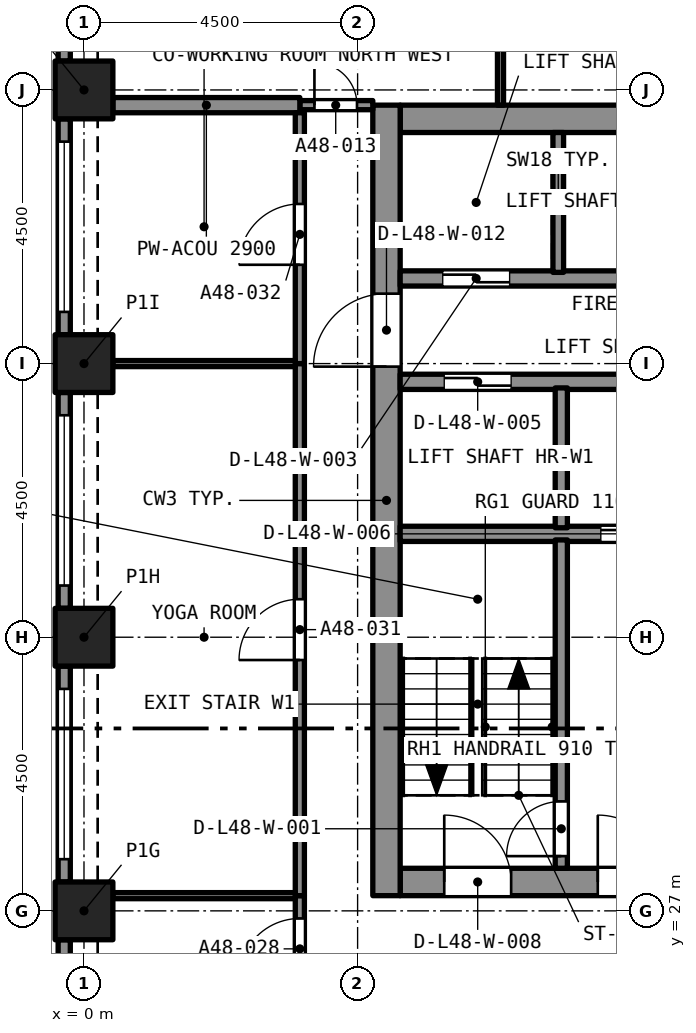
"""IFC4 building model, lengths in metres.
Left out: names, types, materials, properties, quantities, classifications, styles, units other than length and angle.
Written with IfcOpenShell. Run it as: python <this file> out.ifc"""

import sys

from ifc_helpers import new_model, si_unit, direction, frame, frame_2d, origin, origin_2d, place, context, subcontext, project, spatial, rectangle, extrude, element, fill, save


model = new_model("IFC4")
c1 = context("Model", 3, precision=1e-05, world=origin(), true_north=direction((0.0, 1.0)))
c2 = subcontext(c1, "Body", "Model", "MODEL_VIEW")
j1 = project(units=[si_unit("LENGTHUNIT", "METRE"), si_unit("PLANEANGLEUNIT", "RADIAN")], contexts=[c1])
p1 = place(None, origin())
s1 = spatial("IfcSite", under=j1, at=p1, CompositionType="ELEMENT")
p2 = place(p1, origin())
s2 = spatial("IfcBuilding", under=s1, at=p2, CompositionType="ELEMENT")
p3 = place(p2, frame((0.0, 0.0, 176.3)))
s3 = spatial("IfcBuildingStorey", under=s2, at=p3, CompositionType="ELEMENT", Elevation=176.3)
for number, where, z_axis, x_axis in (
    (1, (0.0, 27.0, 0.0), (0.0, 0.0, 1.0), (1.0, 0.0, 0.0)),
    (2, (0.0, 31.5, 0.0), (0.0, 0.0, 1.0), (1.0, 0.0, 0.0)),
    (3, (0.0, 36.0, 0.0), (0.0, 0.0, 1.0), (1.0, 0.0, 0.0)),
    (4, (0.0, 40.5, 0.0), (0.0, 0.0, 1.0), (1.0, 0.0, 0.0)),
):
    element("IfcColumn", number, at=place(p3, frame(where, z_axis=z_axis, x_axis=x_axis)), inside=s3, PredefinedType="COLUMN", context=c2, shape_type="SweptSolid", body=[
        extrude(rectangle(XDim=0.95, YDim=0.95, at=origin_2d()), origin(), (0.0, 0.0, 1.0), 3.2),
    ])
p4 = place(p3, frame((5.2, 27.475, 0.0), z_axis=(0.0, 0.0, 1.0), x_axis=(1.0, 0.0, 0.0)))
e5 = element("IfcWall", 5, at=p4, inside=s3, PredefinedType="SOLIDWALL", context=c2, shape_type="SweptSolid", body=[
    extrude(rectangle(XDim=7.6, YDim=0.45, at=frame_2d((3.8, 0.0))), origin(), (0.0, 0.0, 1.0), 3.2),
])
p5 = place(p4, frame((0.725, 0.0, 0.0)))
e6 = element("IfcOpeningElement", 6, at=p5, cuts=e5, PredefinedType="OPENING", context=c2, shape_type="SweptSolid", body=[
    extrude(rectangle(XDim=1.1, YDim=2.1, at=frame_2d((0.55, 1.05))), frame((0.0, 0.235, 0.0), z_axis=(0.0, -1.0, 0.0), x_axis=(1.0, 0.0, 0.0)), (0.0, 0.0, 1.0), 0.47),
])
p6 = place(p4, frame((3.25, 0.0, 0.0)))
e7 = element("IfcOpeningElement", 7, at=p6, cuts=e5, PredefinedType="OPENING", context=c2, shape_type="SweptSolid", body=[
    extrude(rectangle(XDim=1.1, YDim=2.1, at=frame_2d((0.55, 1.05))), frame((0.0, 0.235, 0.0), z_axis=(0.0, -1.0, 0.0), x_axis=(1.0, 0.0, 0.0)), (0.0, 0.0, 1.0), 0.47),
])
p7 = place(p4, frame((5.775, 0.0, 0.0)))
e8 = element("IfcOpeningElement", 8, at=p7, cuts=e5, PredefinedType="OPENING", context=c2, shape_type="SweptSolid", body=[
    extrude(rectangle(XDim=1.1, YDim=2.1, at=frame_2d((0.55, 1.05))), frame((0.0, 0.235, 0.0), z_axis=(0.0, -1.0, 0.0), x_axis=(1.0, 0.0, 0.0)), (0.0, 0.0, 1.0), 0.47),
])
p8 = place(p3, frame((5.2, 40.025, 0.0), z_axis=(0.0, 0.0, 1.0), x_axis=(1.0, 0.0, 0.0)))
e9 = element("IfcWall", 9, at=p8, inside=s3, PredefinedType="SOLIDWALL", context=c2, shape_type="SweptSolid", body=[
    extrude(rectangle(XDim=7.6, YDim=0.45, at=frame_2d((3.8, 0.0))), origin(), (0.0, 0.0, 1.0), 3.2),
])
p9 = place(p3, frame((4.975, 27.25, 0.0), z_axis=(0.0, 0.0, 1.0), x_axis=(0.0, 1.0, 0.0)))
e10 = element("IfcWall", 10, at=p9, inside=s3, PredefinedType="SOLIDWALL", context=c2, shape_type="SweptSolid", body=[
    extrude(rectangle(XDim=13.0, YDim=0.45, at=frame_2d((6.5, 0.0))), origin(), (0.0, 0.0, 1.0), 3.2),
])
p10 = place(p9, frame((8.7, 0.0, 0.0)))
e11 = element("IfcOpeningElement", 11, at=p10, cuts=e10, PredefinedType="OPENING", context=c2, shape_type="SweptSolid", body=[
    extrude(rectangle(XDim=1.2, YDim=2.1, at=frame_2d((0.6, 1.05))), frame((0.0, 0.235, 0.0), z_axis=(0.0, -1.0, 0.0), x_axis=(1.0, 0.0, 0.0)), (0.0, 0.0, 1.0), 0.47),
])
p11 = place(p3, frame((-0.325, 40.975, 0.0), z_axis=(0.0, 0.0, 1.0), x_axis=(0.0, 1.0, 0.0)))
e12 = element("IfcWall", 12, at=p11, inside=s3, PredefinedType="SOLIDWALL", context=c2, shape_type="SweptSolid", body=[
    extrude(rectangle(XDim=3.55, YDim=0.2, at=frame_2d((1.775, 0.0))), origin(), (0.0, 0.0, 1.0), 3.2),
])
p12 = place(p11, frame((0.375, 0.0, 0.45)))
e13 = element("IfcOpeningElement", 13, at=p12, cuts=e12, PredefinedType="OPENING", context=c2, shape_type="SweptSolid", body=[
    extrude(rectangle(XDim=2.8, YDim=1.95, at=frame_2d((1.4, 0.975))), frame((0.0, 0.11, 0.0), z_axis=(0.0, -1.0, 0.0), x_axis=(1.0, 0.0, 0.0)), (0.0, 0.0, 1.0), 0.22),
])
p13 = place(p3, frame((-0.325, 36.475, 0.0), z_axis=(0.0, 0.0, 1.0), x_axis=(0.0, 1.0, 0.0)))
e14 = element("IfcWall", 14, at=p13, inside=s3, PredefinedType="SOLIDWALL", context=c2, shape_type="SweptSolid", body=[
    extrude(rectangle(XDim=3.55, YDim=0.2, at=frame_2d((1.775, 0.0))), origin(), (0.0, 0.0, 1.0), 3.2),
])
p14 = place(p13, frame((0.375, 0.0, 0.45)))
e15 = element("IfcOpeningElement", 15, at=p14, cuts=e14, PredefinedType="OPENING", context=c2, shape_type="SweptSolid", body=[
    extrude(rectangle(XDim=2.8, YDim=1.95, at=frame_2d((1.4, 0.975))), frame((0.0, 0.11, 0.0), z_axis=(0.0, -1.0, 0.0), x_axis=(1.0, 0.0, 0.0)), (0.0, 0.0, 1.0), 0.22),
])
p15 = place(p3, frame((-0.325, 31.975, 0.0), z_axis=(0.0, 0.0, 1.0), x_axis=(0.0, 1.0, 0.0)))
e16 = element("IfcWall", 16, at=p15, inside=s3, PredefinedType="SOLIDWALL", context=c2, shape_type="SweptSolid", body=[
    extrude(rectangle(XDim=3.55, YDim=0.2, at=frame_2d((1.775, 0.0))), origin(), (0.0, 0.0, 1.0), 3.2),
])
p16 = place(p15, frame((0.375, 0.0, 0.45)))
e17 = element("IfcOpeningElement", 17, at=p16, cuts=e16, PredefinedType="OPENING", context=c2, shape_type="SweptSolid", body=[
    extrude(rectangle(XDim=2.8, YDim=1.95, at=frame_2d((1.4, 0.975))), frame((0.0, 0.11, 0.0), z_axis=(0.0, -1.0, 0.0), x_axis=(1.0, 0.0, 0.0)), (0.0, 0.0, 1.0), 0.22),
])
p17 = place(p3, frame((-0.325, 27.475, 0.0), z_axis=(0.0, 0.0, 1.0), x_axis=(0.0, 1.0, 0.0)))
e18 = element("IfcWall", 18, at=p17, inside=s3, PredefinedType="SOLIDWALL", context=c2, shape_type="SweptSolid", body=[
    extrude(rectangle(XDim=3.55, YDim=0.2, at=frame_2d((1.775, 0.0))), origin(), (0.0, 0.0, 1.0), 3.2),
])
p18 = place(p17, frame((0.375, 0.0, 0.45)))
e19 = element("IfcOpeningElement", 19, at=p18, cuts=e18, PredefinedType="OPENING", context=c2, shape_type="SweptSolid", body=[
    extrude(rectangle(XDim=2.8, YDim=1.95, at=frame_2d((1.4, 0.975))), frame((0.0, 0.11, 0.0), z_axis=(0.0, -1.0, 0.0), x_axis=(1.0, 0.0, 0.0)), (0.0, 0.0, 1.0), 0.22),
])
p19 = place(p3, frame((-0.325, 22.975, 0.0), z_axis=(0.0, 0.0, 1.0), x_axis=(0.0, 1.0, 0.0)))
e20 = element("IfcWall", 20, at=p19, inside=s3, PredefinedType="SOLIDWALL", context=c2, shape_type="SweptSolid", body=[
    extrude(rectangle(XDim=3.55, YDim=0.2, at=frame_2d((1.775, 0.0))), origin(), (0.0, 0.0, 1.0), 3.2),
])
p20 = place(p19, frame((0.375, 0.0, 0.45)))
e21 = element("IfcOpeningElement", 21, at=p20, cuts=e20, PredefinedType="OPENING", context=c2, shape_type="SweptSolid", body=[
    extrude(rectangle(XDim=2.8, YDim=1.95, at=frame_2d((1.4, 0.975))), frame((0.0, 0.11, 0.0), z_axis=(0.0, -1.0, 0.0), x_axis=(1.0, 0.0, 0.0)), (0.0, 0.0, 1.0), 0.22),
])
p21 = place(p3, frame((6.85, 40.25, 0.0), z_axis=(0.0, 0.0, 1.0), x_axis=(0.0, 1.0, 0.0)))
e22 = element("IfcWall", 22, at=p21, inside=s3, PredefinedType="PARTITIONING", context=c2, shape_type="SweptSolid", body=[
    extrude(rectangle(XDim=3.32, YDim=0.1, at=frame_2d((1.66, 0.0))), origin(), (0.0, 0.0, 1.0), 2.9),
])
p22 = place(p3, frame((3.55, 40.25, 0.0), z_axis=(0.0, 0.0, 1.0), x_axis=(1.0, 0.0, 0.0)))
e23 = element("IfcWall", 23, at=p22, inside=s3, PredefinedType="PARTITIONING", context=c2, shape_type="SweptSolid", body=[
    extrude(rectangle(XDim=1.2, YDim=0.15, at=frame_2d((0.6, 0.0))), origin(), (0.0, 0.0, 1.0), 2.9),
])
p23 = place(p22, frame((0.24, 0.0, 0.0)))
e24 = element("IfcOpeningElement", 24, at=p23, cuts=e23, PredefinedType="OPENING", context=c2, shape_type="SweptSolid", body=[
    extrude(rectangle(XDim=0.7, YDim=2.1, at=frame_2d((0.35, 1.05))), frame((0.0, 0.085, 0.0), z_axis=(0.0, -1.0, 0.0), x_axis=(1.0, 0.0, 0.0)), (0.0, 0.0, 1.0), 0.17),
])
p24 = place(p3, frame((0.475, 40.25, 0.0), z_axis=(0.0, 0.0, 1.0), x_axis=(1.0, 0.0, 0.0)))
e25 = element("IfcWall", 25, at=p24, inside=s3, PredefinedType="PARTITIONING", context=c2, shape_type="SweptSolid", body=[
    extrude(rectangle(XDim=3.075, YDim=0.25, at=frame_2d((1.538, 0.0))), origin(), (0.0, 0.0, 1.0), 2.9),
])
p25 = place(p3, frame((3.55, 25.425, 0.0), z_axis=(0.0, 0.0, 1.0), x_axis=(0.0, 1.0, 0.0)))
e26 = element("IfcWall", 26, at=p25, inside=s3, PredefinedType="PARTITIONING", context=c2, shape_type="SweptSolid", body=[
    extrude(rectangle(XDim=1.825, YDim=0.15, at=frame_2d((0.913, 0.0))), origin(), (0.0, 0.0, 1.0), 2.9),
])
p26 = place(p25, frame((0.45, 0.0, 0.0)))
e27 = element("IfcOpeningElement", 27, at=p26, cuts=e26, PredefinedType="OPENING", context=c2, shape_type="SweptSolid", body=[
    extrude(rectangle(XDim=1.0, YDim=2.1, at=frame_2d((0.5, 1.05))), frame((0.0, 0.085, 0.0), z_axis=(0.0, -1.0, 0.0), x_axis=(1.0, 0.0, 0.0)), (0.0, 0.0, 1.0), 0.17),
])
p27 = place(p3, frame((3.55, 27.25, 0.0), z_axis=(0.0, 0.0, 1.0), x_axis=(0.0, 1.0, 0.0)))
e28 = element("IfcWall", 28, at=p27, inside=s3, PredefinedType="PARTITIONING", context=c2, shape_type="SweptSolid", body=[
    extrude(rectangle(XDim=8.75, YDim=0.15, at=frame_2d((4.375, 0.0))), origin(), (0.0, 0.0, 1.0), 2.9),
])
p28 = place(p27, frame((3.875, 0.0, 0.0)))
e29 = element("IfcOpeningElement", 29, at=p28, cuts=e28, PredefinedType="OPENING", context=c2, shape_type="SweptSolid", body=[
    extrude(rectangle(XDim=1.0, YDim=2.1, at=frame_2d((0.5, 1.05))), frame((0.0, 0.085, 0.0), z_axis=(0.0, -1.0, 0.0), x_axis=(1.0, 0.0, 0.0)), (0.0, 0.0, 1.0), 0.17),
])
p29 = place(p3, frame((3.55, 36.0, 0.0), z_axis=(0.0, 0.0, 1.0), x_axis=(0.0, 1.0, 0.0)))
e30 = element("IfcWall", 30, at=p29, inside=s3, PredefinedType="PARTITIONING", context=c2, shape_type="SweptSolid", body=[
    extrude(rectangle(XDim=4.125, YDim=0.15, at=frame_2d((2.062, 0.0))), origin(), (0.0, 0.0, 1.0), 2.9),
])
p30 = place(p29, frame((1.625, 0.0, 0.0)))
e31 = element("IfcOpeningElement", 31, at=p30, cuts=e30, PredefinedType="OPENING", context=c2, shape_type="SweptSolid", body=[
    extrude(rectangle(XDim=1.0, YDim=2.1, at=frame_2d((0.5, 1.05))), frame((0.0, 0.085, 0.0), z_axis=(0.0, -1.0, 0.0), x_axis=(1.0, 0.0, 0.0)), (0.0, 0.0, 1.0), 0.17),
])
for number, where, z_axis, x_axis in (
    (32, (0.475, 27.25, 0.0), (0.0, 0.0, 1.0), (1.0, 0.0, 0.0)),
    (33, (0.475, 36.0, 0.0), (0.0, 0.0, 1.0), (1.0, 0.0, 0.0)),
):
    element("IfcWall", number, at=place(p3, frame(where, z_axis=z_axis, x_axis=x_axis)), inside=s3, PredefinedType="PARTITIONING", context=c2, shape_type="SweptSolid", body=[
        extrude(rectangle(XDim=3.0, YDim=0.1, at=frame_2d((1.5, 0.0))), origin(), (0.0, 0.0, 1.0), 2.9),
    ])
p31 = place(p3, frame((5.2, 33.2, 0.0), z_axis=(0.0, 0.0, 1.0), x_axis=(1.0, 0.0, 0.0)))
e34 = element("IfcWall", 34, at=p31, inside=s3, PredefinedType="SOLIDWALL", context=c2, shape_type="SweptSolid", body=[
    extrude(rectangle(XDim=7.6, YDim=0.25, at=frame_2d((3.8, 0.0))), origin(), (0.0, 0.0, 1.0), 2.9),
])
p32 = place(p31, frame((3.3, 0.0, 0.0)))
e35 = element("IfcOpeningElement", 35, at=p32, cuts=e34, PredefinedType="OPENING", context=c2, shape_type="SweptSolid", body=[
    extrude(rectangle(XDim=1.0, YDim=2.1, at=frame_2d((0.5, 1.05))), frame((0.0, 0.135, 0.0), z_axis=(0.0, -1.0, 0.0), x_axis=(1.0, 0.0, 0.0)), (0.0, 0.0, 1.0), 0.27),
])
p33 = place(p3, frame((5.2, 35.7, 0.0), z_axis=(0.0, 0.0, 1.0), x_axis=(1.0, 0.0, 0.0)))
e36 = element("IfcWall", 36, at=p33, inside=s3, PredefinedType="SOLIDWALL", context=c2, shape_type="SweptSolid", body=[
    extrude(rectangle(XDim=7.6, YDim=0.25, at=frame_2d((3.8, 0.0))), origin(), (0.0, 0.0, 1.0), 2.9),
])
p34 = place(p33, frame((0.725, 0.0, 0.0)))
e37 = element("IfcOpeningElement", 37, at=p34, cuts=e36, PredefinedType="OPENING", context=c2, shape_type="SweptSolid", body=[
    extrude(rectangle(XDim=1.1, YDim=2.4, at=frame_2d((0.55, 1.2))), frame((0.0, 0.135, 0.0), z_axis=(0.0, -1.0, 0.0), x_axis=(1.0, 0.0, 0.0)), (0.0, 0.0, 1.0), 0.27),
])
p35 = place(p33, frame((5.875, 0.0, 0.0)))
e38 = element("IfcOpeningElement", 38, at=p35, cuts=e36, PredefinedType="OPENING", context=c2, shape_type="SweptSolid", body=[
    extrude(rectangle(XDim=0.9, YDim=2.1, at=frame_2d((0.45, 1.05))), frame((0.0, 0.135, 0.0), z_axis=(0.0, -1.0, 0.0), x_axis=(1.0, 0.0, 0.0)), (0.0, 0.0, 1.0), 0.27),
])
p36 = place(p3, frame((5.2, 37.4, 0.0), z_axis=(0.0, 0.0, 1.0), x_axis=(1.0, 0.0, 0.0)))
e39 = element("IfcWall", 39, at=p36, inside=s3, PredefinedType="SOLIDWALL", context=c2, shape_type="SweptSolid", body=[
    extrude(rectangle(XDim=7.6, YDim=0.25, at=frame_2d((3.8, 0.0))), origin(), (0.0, 0.0, 1.0), 2.9),
])
p37 = place(p36, frame((0.7, 0.0, 0.0)))
e40 = element("IfcOpeningElement", 40, at=p37, cuts=e39, PredefinedType="OPENING", context=c2, shape_type="SweptSolid", body=[
    extrude(rectangle(XDim=1.1, YDim=2.4, at=frame_2d((0.55, 1.2))), frame((0.0, 0.135, 0.0), z_axis=(0.0, -1.0, 0.0), x_axis=(1.0, 0.0, 0.0)), (0.0, 0.0, 1.0), 0.27),
])
p38 = place(p3, frame((7.85, 27.7, 0.0), z_axis=(0.0, 0.0, 1.0), x_axis=(0.0, 1.0, 0.0)))
e41 = element("IfcWall", 41, at=p38, inside=s3, PredefinedType="SOLIDWALL", context=c2, shape_type="SweptSolid", body=[
    extrude(rectangle(XDim=5.4, YDim=0.2, at=frame_2d((2.7, 0.0))), origin(), (0.0, 0.0, 1.0), 2.9),
])
p39 = place(p38, frame((0.2, 0.0, 0.0)))
e42 = element("IfcOpeningElement", 42, at=p39, cuts=e41, PredefinedType="OPENING", context=c2, shape_type="SweptSolid", body=[
    extrude(rectangle(XDim=0.9, YDim=2.1, at=frame_2d((0.45, 1.05))), frame((0.0, 0.11, 0.0), z_axis=(0.0, -1.0, 0.0), x_axis=(1.0, 0.0, 0.0)), (0.0, 0.0, 1.0), 0.22),
])
p40 = place(p3, frame((7.85, 33.3, 0.0), z_axis=(0.0, 0.0, 1.0), x_axis=(0.0, 1.0, 0.0)))
e43 = element("IfcWall", 43, at=p40, inside=s3, PredefinedType="SOLIDWALL", context=c2, shape_type="SweptSolid", body=[
    extrude(rectangle(XDim=2.3, YDim=0.2, at=frame_2d((1.15, 0.0))), origin(), (0.0, 0.0, 1.0), 2.9),
])
p41 = place(p3, frame((7.8, 37.5, 0.0), z_axis=(0.0, 0.0, 1.0), x_axis=(0.0, 1.0, 0.0)))
e44 = element("IfcWall", 44, at=p41, inside=s3, PredefinedType="SOLIDWALL", context=c2, shape_type="SweptSolid", body=[
    extrude(rectangle(XDim=2.3, YDim=0.175, at=frame_2d((1.15, 0.0))), origin(), (0.0, 0.0, 1.0), 2.9),
])
p42 = place(p14, origin())
e45 = element("IfcWindow", 45, at=p42, inside=s3, PartitioningType="SINGLE_PANEL", PredefinedType="WINDOW", context=c2, shape_type="SweptSolid", body=[
    extrude(rectangle(XDim=2.8, YDim=1.95, at=frame_2d((1.4, 0.975))), frame((0.0, 0.03, 0.0), z_axis=(0.0, -1.0, 0.0), x_axis=(1.0, 0.0, 0.0)), (0.0, 0.0, 1.0), 0.06),
])
fill(e15, e45)
p43 = place(p16, origin())
e46 = element("IfcWindow", 46, at=p43, inside=s3, PartitioningType="SINGLE_PANEL", PredefinedType="WINDOW", context=c2, shape_type="SweptSolid", body=[
    extrude(rectangle(XDim=2.8, YDim=1.95, at=frame_2d((1.4, 0.975))), frame((0.0, 0.03, 0.0), z_axis=(0.0, -1.0, 0.0), x_axis=(1.0, 0.0, 0.0)), (0.0, 0.0, 1.0), 0.06),
])
fill(e17, e46)
p44 = place(p18, origin())
e47 = element("IfcWindow", 47, at=p44, inside=s3, PartitioningType="SINGLE_PANEL", PredefinedType="WINDOW", context=c2, shape_type="SweptSolid", body=[
    extrude(rectangle(XDim=2.8, YDim=1.95, at=frame_2d((1.4, 0.975))), frame((0.0, 0.03, 0.0), z_axis=(0.0, -1.0, 0.0), x_axis=(1.0, 0.0, 0.0)), (0.0, 0.0, 1.0), 0.06),
])
fill(e19, e47)
p45 = place(p23, origin())
e48 = element("IfcDoor", 48, at=p45, inside=s3, OperationType="SINGLE_SWING_LEFT", PredefinedType="DOOR", context=c2, shape_type="SweptSolid", body=[
    extrude(rectangle(XDim=0.7, YDim=2.1, at=frame_2d((0.35, 1.05))), frame((0.0, 0.025, 0.0), z_axis=(0.0, -1.0, 0.0), x_axis=(1.0, 0.0, 0.0)), (0.0, 0.0, 1.0), 0.05),
])
fill(e24, e48)
p46 = place(p26, origin())
e49 = element("IfcDoor", 49, at=p46, inside=s3, OperationType="SINGLE_SWING_RIGHT", PredefinedType="DOOR", context=c2, shape_type="SweptSolid", body=[
    extrude(rectangle(XDim=1.0, YDim=2.1, at=frame_2d((0.5, 1.05))), frame((0.0, 0.025, 0.0), z_axis=(0.0, -1.0, 0.0), x_axis=(1.0, 0.0, 0.0)), (0.0, 0.0, 1.0), 0.05),
])
fill(e27, e49)
p47 = place(p28, origin())
e50 = element("IfcDoor", 50, at=p47, inside=s3, OperationType="SINGLE_SWING_RIGHT", PredefinedType="DOOR", context=c2, shape_type="SweptSolid", body=[
    extrude(rectangle(XDim=1.0, YDim=2.1, at=frame_2d((0.5, 1.05))), frame((0.0, 0.025, 0.0), z_axis=(0.0, -1.0, 0.0), x_axis=(1.0, 0.0, 0.0)), (0.0, 0.0, 1.0), 0.05),
])
fill(e29, e50)
p48 = place(p30, origin())
e51 = element("IfcDoor", 51, at=p48, inside=s3, OperationType="SINGLE_SWING_RIGHT", PredefinedType="DOOR", context=c2, shape_type="SweptSolid", body=[
    extrude(rectangle(XDim=1.0, YDim=2.1, at=frame_2d((0.5, 1.05))), frame((0.0, 0.025, 0.0), z_axis=(0.0, -1.0, 0.0), x_axis=(1.0, 0.0, 0.0)), (0.0, 0.0, 1.0), 0.05),
])
fill(e31, e51)
p49 = place(p39, origin())
e52 = element("IfcDoor", 52, at=p49, inside=s3, OperationType="SINGLE_SWING_LEFT", PredefinedType="DOOR", context=c2, shape_type="SweptSolid", body=[
    extrude(rectangle(XDim=0.9, YDim=2.1, at=frame_2d((0.45, 1.05))), frame((0.0, 0.025, 0.0), z_axis=(0.0, -1.0, 0.0), x_axis=(1.0, 0.0, 0.0)), (0.0, 0.0, 1.0), 0.05),
])
fill(e42, e52)
p50 = place(p37, origin())
e53 = element("IfcDoor", 53, at=p50, inside=s3, OperationType="SLIDING_TO_LEFT", PredefinedType="DOOR", context=c2, shape_type="SweptSolid", body=[
    extrude(rectangle(XDim=1.1, YDim=2.4, at=frame_2d((0.55, 1.2))), frame((0.0, 0.025, 0.0), z_axis=(0.0, -1.0, 0.0), x_axis=(1.0, 0.0, 0.0)), (0.0, 0.0, 1.0), 0.05),
])
fill(e40, e53)
p51 = place(p34, origin())
e54 = element("IfcDoor", 54, at=p51, inside=s3, OperationType="SLIDING_TO_LEFT", PredefinedType="DOOR", context=c2, shape_type="SweptSolid", body=[
    extrude(rectangle(XDim=1.1, YDim=2.4, at=frame_2d((0.55, 1.2))), frame((0.0, 0.025, 0.0), z_axis=(0.0, -1.0, 0.0), x_axis=(1.0, 0.0, 0.0)), (0.0, 0.0, 1.0), 0.05),
])
fill(e37, e54)
p52 = place(p32, origin())
e55 = element("IfcDoor", 55, at=p52, inside=s3, OperationType="SLIDING_TO_LEFT", PredefinedType="DOOR", context=c2, shape_type="SweptSolid", body=[
    extrude(rectangle(XDim=1.0, YDim=2.1, at=frame_2d((0.5, 1.05))), frame((0.0, 0.025, 0.0), z_axis=(0.0, -1.0, 0.0), x_axis=(1.0, 0.0, 0.0)), (0.0, 0.0, 1.0), 0.05),
])
fill(e35, e55)
p53 = place(p5, origin())
e56 = element("IfcDoor", 56, at=p53, inside=s3, OperationType="SINGLE_SWING_LEFT", PredefinedType="DOOR", context=c2, shape_type="SweptSolid", body=[
    extrude(rectangle(XDim=1.1, YDim=2.1, at=frame_2d((0.55, 1.05))), frame((0.0, 0.025, 0.0), z_axis=(0.0, -1.0, 0.0), x_axis=(1.0, 0.0, 0.0)), (0.0, 0.0, 1.0), 0.05),
])
fill(e6, e56)
p54 = place(p6, origin())
e57 = element("IfcDoor", 57, at=p54, inside=s3, OperationType="SINGLE_SWING_LEFT", PredefinedType="DOOR", context=c2, shape_type="SweptSolid", body=[
    extrude(rectangle(XDim=1.1, YDim=2.1, at=frame_2d((0.55, 1.05))), frame((0.0, 0.025, 0.0), z_axis=(0.0, -1.0, 0.0), x_axis=(1.0, 0.0, 0.0)), (0.0, 0.0, 1.0), 0.05),
])
fill(e7, e57)
p55 = place(p10, origin())
e58 = element("IfcDoor", 58, at=p55, inside=s3, OperationType="SINGLE_SWING_LEFT", PredefinedType="DOOR", context=c2, shape_type="SweptSolid", body=[
    extrude(rectangle(XDim=1.2, YDim=2.1, at=frame_2d((0.6, 1.05))), frame((0.0, 0.025, 0.0), z_axis=(0.0, -1.0, 0.0), x_axis=(1.0, 0.0, 0.0)), (0.0, 0.0, 1.0), 0.05),
])
fill(e11, e58)
save(model, sys.argv[1])
